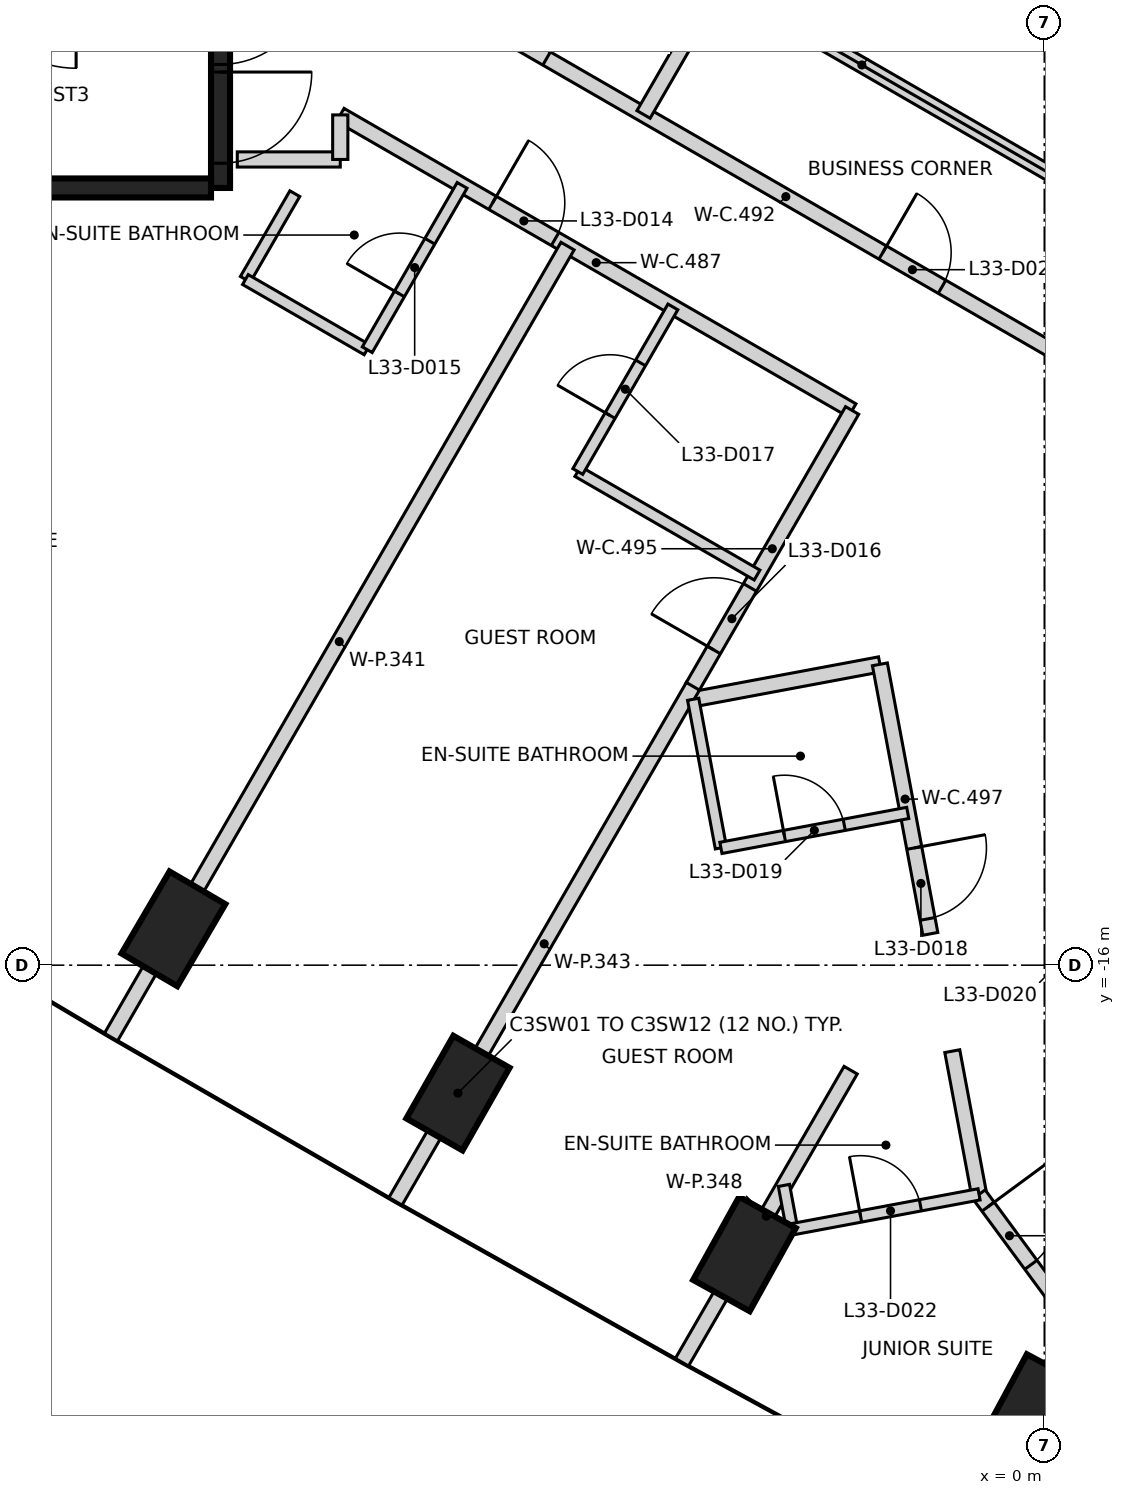
"""IFC4 building model, lengths in metres.
Left out: names, types, materials, properties, quantities, classifications, styles, units other than length and angle.
Written with IfcOpenShell. Run it as: python <this file> out.ifc"""

import sys

from ifc_helpers import new_model, si_unit, direction, frame, frame_2d, origin, origin_2d, place, context, subcontext, project, spatial, rectangle, extrude, element, fill, save


model = new_model("IFC4")
c1 = context("Model", 3, precision=1e-05, world=origin(), true_north=direction((0.0, 1.0)))
c2 = subcontext(c1, "Body", "Model", "MODEL_VIEW")
j1 = project(units=[si_unit("LENGTHUNIT", "METRE"), si_unit("PLANEANGLEUNIT", "RADIAN")], contexts=[c1])
p1 = place(None, origin())
s1 = spatial("IfcSite", under=j1, at=p1, CompositionType="ELEMENT")
p2 = place(p1, origin())
s2 = spatial("IfcBuilding", under=s1, at=p2, CompositionType="ELEMENT")
p3 = place(p2, frame((0.0, 0.0, 136.0)))
s3 = spatial("IfcBuildingStorey", under=s2, at=p3, CompositionType="ELEMENT", Elevation=136.0)
for number, where, z_axis, x_axis in (
    (1, (-11.457, -15.522, -0.4), (0.0, 0.0, 1.0), (0.505, 0.863, 0.0)),
    (2, (-7.714, -17.683, -0.4), (0.0, 0.0, 1.0), (0.495, 0.869, 0.0)),
    (3, (-3.945, -19.8, -0.4), (0.0, 0.0, 1.0), (0.485, 0.875, 0.0)),
    (4, (-0.151, -21.871, -0.4), (0.0, 0.0, 1.0), (0.474, 0.881, 0.0)),
):
    element("IfcColumn", number, at=place(p3, frame(where, z_axis=z_axis, x_axis=x_axis)), inside=s3, PredefinedType="COLUMN", context=c2, shape_type="SweptSolid", body=[
        extrude(rectangle(XDim=1.25, YDim=0.85, at=origin_2d()), origin(), (0.0, 0.0, 1.0), 3.6),
    ])
p4 = place(p3, frame((-10.837, 5.775, 0.0), z_axis=(0.0, 0.0, 1.0), x_axis=(0.0, -1.0, 0.0)))
e5 = element("IfcWall", 5, at=p4, inside=s3, PredefinedType="SHEAR", context=c2, shape_type="SweptSolid", body=[
    extrude(rectangle(XDim=11.55, YDim=0.25, at=frame_2d((5.775, 0.0))), origin(), (0.0, 0.0, 1.0), 3.2),
])
p5 = place(p4, frame((10.025, 0.0, 0.0)))
e6 = element("IfcOpeningElement", 6, at=p5, cuts=e5, PredefinedType="OPENING", context=c2, shape_type="SweptSolid", body=[
    extrude(rectangle(XDim=1.2, YDim=2.1, at=frame_2d((0.6, 1.05))), frame((0.0, 0.135, 0.0), z_axis=(0.0, -1.0, 0.0), x_axis=(1.0, 0.0, 0.0)), (0.0, 0.0, 1.0), 0.27),
])
p6 = place(p4, frame((8.725, 0.0, 0.0)))
e7 = element("IfcOpeningElement", 7, at=p6, cuts=e5, PredefinedType="OPENING", context=c2, shape_type="SweptSolid", body=[
    extrude(rectangle(XDim=1.2, YDim=2.1, at=frame_2d((0.6, 1.05))), frame((0.0, 0.135, 0.0), z_axis=(0.0, -1.0, 0.0), x_axis=(1.0, 0.0, 0.0)), (0.0, 0.0, 1.0), 0.27),
])
p7 = place(p3, frame((-10.963, -5.775, 0.0), z_axis=(0.0, 0.0, 1.0), x_axis=(-1.0, 0.0, 0.0)))
e8 = element("IfcWall", 8, at=p7, inside=s3, PredefinedType="SHEAR", context=c2, shape_type="SweptSolid", body=[
    extrude(rectangle(XDim=5.225, YDim=0.25, at=frame_2d((2.612, 0.0))), origin(), (0.0, 0.0, 1.0), 3.2),
])
p8 = place(p3, frame((-10.617, -5.4, 0.0), z_axis=(0.0, 0.0, 1.0), x_axis=(1.0, 0.0, 0.0)))
e9 = element("IfcWall", 9, at=p8, inside=s3, PredefinedType="PARTITIONING", context=c2, shape_type="SweptSolid", body=[
    extrude(rectangle(XDim=1.355, YDim=0.2, at=frame_2d((0.677, 0.0))), origin(), (0.0, 0.0, 1.0), 3.2),
])
p9 = place(p3, frame((-9.262, -4.814, 0.0), z_axis=(0.0, 0.0, 1.0), x_axis=(0.866109782156, -0.499853823887, 0.0)))
e10 = element("IfcWall", 10, at=p9, inside=s3, PredefinedType="PARTITIONING", context=c2, shape_type="SweptSolid", body=[
    extrude(rectangle(XDim=7.776, YDim=0.2, at=frame_2d((3.888, 0.0))), origin(), (0.0, 0.0, 1.0), 3.2),
])
p10 = place(p9, frame((2.314, 0.0, 0.0)))
e11 = element("IfcOpeningElement", 11, at=p10, cuts=e10, PredefinedType="OPENING", context=c2, shape_type="SweptSolid", body=[
    extrude(rectangle(XDim=0.95, YDim=2.1, at=frame_2d((0.475, 1.05))), frame((0.0, 0.11, 0.0), z_axis=(0.0, -1.0, 0.0), x_axis=(1.0, 0.0, 0.0)), (0.0, 0.0, 1.0), 0.22),
])
p11 = place(p3, frame((-9.262, -5.4, 0.0), z_axis=(0.0, 0.0, 1.0), x_axis=(0.0, 1.0, 0.0)))
e12 = element("IfcWall", 12, at=p11, inside=s3, PredefinedType="PARTITIONING", context=c2, shape_type="SweptSolid", body=[
    extrude(rectangle(XDim=0.586, YDim=0.2, at=frame_2d((0.293, 0.0))), origin(), (0.0, 0.0, 1.0), 3.2),
])
p12 = place(p3, frame((-8.612, -2.88, 0.0), z_axis=(0.0, 0.0, 1.0), x_axis=(0.866035279512, -0.499982894348, 0.0)))
e13 = element("IfcWall", 13, at=p12, inside=s3, PredefinedType="PARTITIONING", context=c2, shape_type="SweptSolid", body=[
    extrude(rectangle(XDim=12.037, YDim=0.2, at=frame_2d((6.018, 0.0))), origin(), (0.0, 0.0, 1.0), 3.2),
])
p13 = place(p12, frame((1.484, 0.0, 0.0)))
e14 = element("IfcOpeningElement", 14, at=p13, cuts=e13, PredefinedType="OPENING", context=c2, shape_type="SweptSolid", body=[
    extrude(rectangle(XDim=0.9, YDim=2.1, at=frame_2d((0.45, 1.05))), frame((0.0, 0.11, 0.0), z_axis=(0.0, -1.0, 0.0), x_axis=(1.0, 0.0, 0.0)), (0.0, 0.0, 1.0), 0.22),
])
p14 = place(p12, frame((7.491, 0.0, 0.0)))
e15 = element("IfcOpeningElement", 15, at=p14, cuts=e13, PredefinedType="OPENING", context=c2, shape_type="SweptSolid", body=[
    extrude(rectangle(XDim=0.9, YDim=2.1, at=frame_2d((0.45, 1.05))), frame((0.0, 0.11, 0.0), z_axis=(0.0, -1.0, 0.0), x_axis=(1.0, 0.0, 0.0)), (0.0, 0.0, 1.0), 0.22),
])
p15 = place(p3, frame((-4.629, -12.341, 0.0), z_axis=(0.0, 0.0, 1.0), x_axis=(0.500069467685, 0.865985292883, 0.0)))
e16 = element("IfcWall", 16, at=p15, inside=s3, PredefinedType="PARTITIONING", context=c2, shape_type="SweptSolid", body=[
    extrude(rectangle(XDim=4.202, YDim=0.2, at=frame_2d((2.101, 0.0))), origin(), (0.0, 0.0, 1.0), 3.2),
])
p16 = place(p15, frame((0.564, 0.0, 0.0)))
e17 = element("IfcOpeningElement", 17, at=p16, cuts=e16, PredefinedType="OPENING", context=c2, shape_type="SweptSolid", body=[
    extrude(rectangle(XDim=0.95, YDim=2.1, at=frame_2d((0.475, 1.05))), frame((0.0, 0.11, 0.0), z_axis=(0.0, -1.0, 0.0), x_axis=(1.0, 0.0, 0.0)), (0.0, 0.0, 1.0), 0.22),
])
p17 = place(p3, frame((-4.6, -12.498, 0.0), z_axis=(0.0, 0.0, 1.0), x_axis=(0.982950102255, 0.183872500602, 0.0)))
e18 = element("IfcWall", 18, at=p17, inside=s3, PredefinedType="PARTITIONING", context=c2, shape_type="SweptSolid", body=[
    extrude(rectangle(XDim=2.48, YDim=0.2, at=frame_2d((1.24, 0.0))), origin(), (0.0, 0.0, 1.0), 3.2),
])
p18 = place(p3, frame((-2.163, -12.042, 0.0), z_axis=(0.0, 0.0, 1.0), x_axis=(0.183945287989, -0.982936483719, 0.0)))
e19 = element("IfcWall", 19, at=p18, inside=s3, PredefinedType="PARTITIONING", context=c2, shape_type="SweptSolid", body=[
    extrude(rectangle(XDim=3.607, YDim=0.2, at=frame_2d((1.804, 0.0))), origin(), (0.0, 0.0, 1.0), 3.2),
])
p19 = place(p18, frame((2.458, 0.0, 0.0)))
e20 = element("IfcOpeningElement", 20, at=p19, cuts=e19, PredefinedType="OPENING", context=c2, shape_type="SweptSolid", body=[
    extrude(rectangle(XDim=0.95, YDim=2.1, at=frame_2d((0.475, 1.05))), frame((0.0, 0.11, 0.0), z_axis=(0.0, -1.0, 0.0), x_axis=(1.0, 0.0, 0.0)), (0.0, 0.0, 1.0), 0.22),
])
p20 = place(p3, frame((-1.21, -17.131, 0.0), z_axis=(0.0, 0.0, 1.0), x_axis=(0.183950101319, -0.982935582948, 0.0)))
e21 = element("IfcWall", 21, at=p20, inside=s3, PredefinedType="PARTITIONING", context=c2, shape_type="SweptSolid", body=[
    extrude(rectangle(XDim=1.917, YDim=0.2, at=frame_2d((0.958, 0.0))), origin(), (0.0, 0.0, 1.0), 3.2),
])
p21 = place(p3, frame((-0.858, -19.016, 0.0), z_axis=(0.0, 0.0, 1.0), x_axis=(0.593123867414, -0.805111220829, 0.0)))
e22 = element("IfcWall", 22, at=p21, inside=s3, PredefinedType="PARTITIONING", context=c2, shape_type="SweptSolid", body=[
    extrude(rectangle(XDim=2.77, YDim=0.2, at=frame_2d((1.385, 0.0))), origin(), (0.0, 0.0, 1.0), 3.2),
])
p22 = place(p21, frame((0.2, 0.0, 0.0)))
e23 = element("IfcOpeningElement", 23, at=p22, cuts=e22, PredefinedType="OPENING", context=c2, shape_type="SweptSolid", body=[
    extrude(rectangle(XDim=0.95, YDim=2.1, at=frame_2d((0.475, 1.05))), frame((0.0, 0.11, 0.0), z_axis=(0.0, -1.0, 0.0), x_axis=(1.0, 0.0, 0.0)), (0.0, 0.0, 1.0), 0.22),
])
p23 = place(p3, frame((-12.278, -16.946, 0.0), z_axis=(0.0, 0.0, 1.0), x_axis=(0.499887212932, 0.866090511637, 0.0)))
e24 = element("IfcWall", 24, at=p23, inside=s3, PredefinedType="PARTITIONING", context=c2, shape_type="SweptSolid", body=[
    extrude(rectangle(XDim=12.015, YDim=0.2, at=frame_2d((6.007, 0.0))), origin(), (0.0, 0.0, 1.0), 3.2),
])
p24 = place(p3, frame((-8.535, -19.107, 0.0), z_axis=(0.0, 0.0, 1.0), x_axis=(0.500028565219, 0.866008911019, 0.0)))
e25 = element("IfcWall", 25, at=p24, inside=s3, PredefinedType="PARTITIONING", context=c2, shape_type="SweptSolid", body=[
    extrude(rectangle(XDim=7.824, YDim=0.2, at=frame_2d((3.912, 0.0))), origin(), (0.0, 0.0, 1.0), 3.2),
])
p25 = place(p3, frame((-8.0, -0.924, 0.0), z_axis=(0.0, 0.0, 1.0), x_axis=(0.86604129137, -0.499972480886, 0.0)))
e26 = element("IfcWall", 26, at=p25, inside=s3, PredefinedType="PARTITIONING", context=c2, shape_type="SweptSolid", body=[
    extrude(rectangle(XDim=12.932, YDim=0.2, at=frame_2d((6.466, 0.0))), origin(), (0.0, 0.0, 1.0), 2.3),
])
p26 = place(p3, frame((-5.272, -4.808, 0.0), z_axis=(0.0, 0.0, 1.0), x_axis=(0.499880961361, 0.866094119867, 0.0)))
e27 = element("IfcWall", 27, at=p26, inside=s3, PredefinedType="PARTITIONING", context=c2, shape_type="SweptSolid", body=[
    extrude(rectangle(XDim=2.0, YDim=0.2, at=frame_2d((1.0, 0.0))), origin(), (0.0, 0.0, 1.0), 2.3),
])
p27 = place(p3, frame((-4.767, -21.223, 0.0), z_axis=(0.0, 0.0, 1.0), x_axis=(0.500305100915, 0.865849182017, 0.0)))
e28 = element("IfcWall", 28, at=p27, inside=s3, PredefinedType="PARTITIONING", context=c2, shape_type="SweptSolid", body=[
    extrude(rectangle(XDim=4.437, YDim=0.2, at=frame_2d((2.218, 0.0))), origin(), (0.0, 0.0, 1.0), 3.2),
])
p28 = place(p3, frame((-10.511, -6.977, 0.0), z_axis=(0.0, 0.0, 1.0), x_axis=(0.500274472704, 0.865866878891, 0.0)))
e29 = element("IfcWall", 29, at=p28, inside=s3, PredefinedType="PARTITIONING", context=c2, shape_type="SweptSolid", body=[
    extrude(rectangle(XDim=1.302, YDim=0.15, at=frame_2d((0.651, 0.0))), origin(), (0.0, 0.0, 1.0), 3.2),
])
p29 = place(p3, frame((-10.51, -6.98, 0.0), z_axis=(0.0, 0.0, 1.0), x_axis=(0.865965533559, -0.500103683937, 0.0)))
e30 = element("IfcWall", 30, at=p29, inside=s3, PredefinedType="PARTITIONING", context=c2, shape_type="SweptSolid", body=[
    extrude(rectangle(XDim=1.848, YDim=0.15, at=frame_2d((0.924, 0.0))), origin(), (0.0, 0.0, 1.0), 3.2),
])
p30 = place(p3, frame((-8.907, -7.903, 0.0), z_axis=(0.0, 0.0, 1.0), x_axis=(0.499925626596, 0.866068339032, 0.0)))
e31 = element("IfcWall", 31, at=p30, inside=s3, PredefinedType="PARTITIONING", context=c2, shape_type="SweptSolid", body=[
    extrude(rectangle(XDim=2.497, YDim=0.15, at=frame_2d((1.248, 0.0))), origin(), (0.0, 0.0, 1.0), 3.2),
])
p31 = place(p30, frame((0.848, 0.0, 0.0)))
e32 = element("IfcOpeningElement", 32, at=p31, cuts=e31, PredefinedType="OPENING", context=c2, shape_type="SweptSolid", body=[
    extrude(rectangle(XDim=0.8, YDim=2.1, at=frame_2d((0.4, 1.05))), frame((0.0, 0.085, 0.0), z_axis=(0.0, -1.0, 0.0), x_axis=(1.0, 0.0, 0.0)), (0.0, 0.0, 1.0), 0.17),
])
p32 = place(p3, frame((-6.137, -9.505, 0.0), z_axis=(0.0, 0.0, 1.0), x_axis=(0.866000497904, -0.50004313577, 0.0)))
e33 = element("IfcWall", 33, at=p32, inside=s3, PredefinedType="PARTITIONING", context=c2, shape_type="SweptSolid", body=[
    extrude(rectangle(XDim=2.724, YDim=0.15, at=frame_2d((1.362, 0.0))), origin(), (0.0, 0.0, 1.0), 3.2),
])
p33 = place(p3, frame((-6.137, -9.505, 0.0), z_axis=(0.0, 0.0, 1.0), x_axis=(0.500339416332, 0.86582935297, 0.0)))
e34 = element("IfcWall", 34, at=p33, inside=s3, PredefinedType="PARTITIONING", context=c2, shape_type="SweptSolid", body=[
    extrude(rectangle(XDim=2.5, YDim=0.15, at=frame_2d((1.25, 0.0))), origin(), (0.0, 0.0, 1.0), 3.2),
])
p34 = place(p33, frame((0.85, 0.0, 0.0)))
e35 = element("IfcOpeningElement", 35, at=p34, cuts=e34, PredefinedType="OPENING", context=c2, shape_type="SweptSolid", body=[
    extrude(rectangle(XDim=0.8, YDim=2.1, at=frame_2d((0.4, 1.05))), frame((0.0, 0.085, 0.0), z_axis=(0.0, -1.0, 0.0), x_axis=(1.0, 0.0, 0.0)), (0.0, 0.0, 1.0), 0.17),
])
p35 = place(p3, frame((-4.619, -12.502, 0.0), z_axis=(0.0, 0.0, 1.0), x_axis=(0.183517674038, -0.983016410502, 0.0)))
e36 = element("IfcWall", 36, at=p35, inside=s3, PredefinedType="PARTITIONING", context=c2, shape_type="SweptSolid", body=[
    extrude(rectangle(XDim=1.989, YDim=0.15, at=frame_2d((0.994, 0.0))), origin(), (0.0, 0.0, 1.0), 3.2),
])
p36 = place(p3, frame((-4.254, -14.457, 0.0), z_axis=(0.0, 0.0, 1.0), x_axis=(0.98293843799, 0.183934844773, 0.0)))
e37 = element("IfcWall", 37, at=p36, inside=s3, PredefinedType="PARTITIONING", context=c2, shape_type="SweptSolid", body=[
    extrude(rectangle(XDim=2.501, YDim=0.15, at=frame_2d((1.25, 0.0))), origin(), (0.0, 0.0, 1.0), 3.2),
])
p37 = place(p36, frame((0.85, 0.0, 0.0)))
e38 = element("IfcOpeningElement", 38, at=p37, cuts=e37, PredefinedType="OPENING", context=c2, shape_type="SweptSolid", body=[
    extrude(rectangle(XDim=0.8, YDim=2.1, at=frame_2d((0.4, 1.05))), frame((0.0, 0.085, 0.0), z_axis=(0.0, -1.0, 0.0), x_axis=(1.0, 0.0, 0.0)), (0.0, 0.0, 1.0), 0.17),
])
p38 = place(p3, frame((-3.425, -18.897, 0.0), z_axis=(0.0, 0.0, 1.0), x_axis=(0.183861553242, -0.982952150025, 0.0)))
e39 = element("IfcWall", 39, at=p38, inside=s3, PredefinedType="PARTITIONING", context=c2, shape_type="SweptSolid", body=[
    extrude(rectangle(XDim=0.587, YDim=0.15, at=frame_2d((0.293, 0.0))), origin(), (0.0, 0.0, 1.0), 3.2),
])
p39 = place(p3, frame((-3.315, -19.474, 0.0), z_axis=(0.0, 0.0, 1.0), x_axis=(0.982978173855, 0.183722371326, 0.0)))
e40 = element("IfcWall", 40, at=p39, inside=s3, PredefinedType="PARTITIONING", context=c2, shape_type="SweptSolid", body=[
    extrude(rectangle(XDim=2.5, YDim=0.15, at=frame_2d((1.25, 0.0))), origin(), (0.0, 0.0, 1.0), 3.2),
])
p40 = place(p39, frame((0.915, 0.0, 0.0)))
e41 = element("IfcOpeningElement", 41, at=p40, cuts=e40, PredefinedType="OPENING", context=c2, shape_type="SweptSolid", body=[
    extrude(rectangle(XDim=0.8, YDim=2.1, at=frame_2d((0.4, 1.05))), frame((0.0, 0.085, 0.0), z_axis=(0.0, -1.0, 0.0), x_axis=(1.0, 0.0, 0.0)), (0.0, 0.0, 1.0), 0.17),
])
p41 = place(p5, origin())
e42 = element("IfcDoor", 42, at=p41, inside=s3, OperationType="SINGLE_SWING_LEFT", PredefinedType="DOOR", context=c2, shape_type="SweptSolid", body=[
    extrude(rectangle(XDim=1.2, YDim=2.1, at=frame_2d((0.6, 1.05))), frame((0.0, 0.025, 0.0), z_axis=(0.0, -1.0, 0.0), x_axis=(1.0, 0.0, 0.0)), (0.0, 0.0, 1.0), 0.05),
])
fill(e6, e42)
p42 = place(p6, origin())
e43 = element("IfcDoor", 43, at=p42, inside=s3, OperationType="SINGLE_SWING_RIGHT", PredefinedType="DOOR", context=c2, shape_type="SweptSolid", body=[
    extrude(rectangle(XDim=1.2, YDim=2.1, at=frame_2d((0.6, 1.05))), frame((0.0, 0.025, 0.0), z_axis=(0.0, -1.0, 0.0), x_axis=(1.0, 0.0, 0.0)), (0.0, 0.0, 1.0), 0.05),
])
fill(e7, e43)
p43 = place(p10, frame((0.95, 0.0, 0.0), z_axis=(0.0, 0.0, 1.0), x_axis=(-1.0, 0.0, 0.0)))
e44 = element("IfcDoor", 44, at=p43, inside=s3, OperationType="SINGLE_SWING_LEFT", PredefinedType="DOOR", context=c2, shape_type="SweptSolid", body=[
    extrude(rectangle(XDim=0.95, YDim=2.1, at=frame_2d((0.475, 1.05))), frame((0.0, 0.025, 0.0), z_axis=(0.0, -1.0, 0.0), x_axis=(1.0, 0.0, 0.0)), (0.0, 0.0, 1.0), 0.05),
])
fill(e11, e44)
p44 = place(p31, origin())
e45 = element("IfcDoor", 45, at=p44, inside=s3, OperationType="SINGLE_SWING_LEFT", PredefinedType="DOOR", context=c2, shape_type="SweptSolid", body=[
    extrude(rectangle(XDim=0.8, YDim=2.1, at=frame_2d((0.4, 1.05))), frame((0.0, 0.025, 0.0), z_axis=(0.0, -1.0, 0.0), x_axis=(1.0, 0.0, 0.0)), (0.0, 0.0, 1.0), 0.05),
])
fill(e32, e45)
p45 = place(p16, origin())
e46 = element("IfcDoor", 46, at=p45, inside=s3, OperationType="SINGLE_SWING_LEFT", PredefinedType="DOOR", context=c2, shape_type="SweptSolid", body=[
    extrude(rectangle(XDim=0.95, YDim=2.1, at=frame_2d((0.475, 1.05))), frame((0.0, 0.025, 0.0), z_axis=(0.0, -1.0, 0.0), x_axis=(1.0, 0.0, 0.0)), (0.0, 0.0, 1.0), 0.05),
])
fill(e17, e46)
p46 = place(p34, frame((0.8, 0.0, 0.0), z_axis=(0.0, 0.0, 1.0), x_axis=(-1.0, 0.0, 0.0)))
e47 = element("IfcDoor", 47, at=p46, inside=s3, OperationType="SINGLE_SWING_LEFT", PredefinedType="DOOR", context=c2, shape_type="SweptSolid", body=[
    extrude(rectangle(XDim=0.8, YDim=2.1, at=frame_2d((0.4, 1.05))), frame((0.0, 0.025, 0.0), z_axis=(0.0, -1.0, 0.0), x_axis=(1.0, 0.0, 0.0)), (0.0, 0.0, 1.0), 0.05),
])
fill(e35, e47)
p47 = place(p19, frame((0.95, 0.0, 0.0), z_axis=(0.0, 0.0, 1.0), x_axis=(-1.0, 0.0, 0.0)))
e48 = element("IfcDoor", 48, at=p47, inside=s3, OperationType="SINGLE_SWING_LEFT", PredefinedType="DOOR", context=c2, shape_type="SweptSolid", body=[
    extrude(rectangle(XDim=0.95, YDim=2.1, at=frame_2d((0.475, 1.05))), frame((0.0, 0.025, 0.0), z_axis=(0.0, -1.0, 0.0), x_axis=(1.0, 0.0, 0.0)), (0.0, 0.0, 1.0), 0.05),
])
fill(e20, e48)
p48 = place(p37, frame((0.8, 0.0, 0.0), z_axis=(0.0, 0.0, 1.0), x_axis=(-1.0, 0.0, 0.0)))
e49 = element("IfcDoor", 49, at=p48, inside=s3, OperationType="SINGLE_SWING_LEFT", PredefinedType="DOOR", context=c2, shape_type="SweptSolid", body=[
    extrude(rectangle(XDim=0.8, YDim=2.1, at=frame_2d((0.4, 1.05))), frame((0.0, 0.025, 0.0), z_axis=(0.0, -1.0, 0.0), x_axis=(1.0, 0.0, 0.0)), (0.0, 0.0, 1.0), 0.05),
])
fill(e38, e49)
p49 = place(p22, frame((0.95, 0.0, 0.0), z_axis=(0.0, 0.0, 1.0), x_axis=(-1.0, 0.0, 0.0)))
e50 = element("IfcDoor", 50, at=p49, inside=s3, OperationType="SINGLE_SWING_LEFT", PredefinedType="DOOR", context=c2, shape_type="SweptSolid", body=[
    extrude(rectangle(XDim=0.95, YDim=2.1, at=frame_2d((0.475, 1.05))), frame((0.0, 0.025, 0.0), z_axis=(0.0, -1.0, 0.0), x_axis=(1.0, 0.0, 0.0)), (0.0, 0.0, 1.0), 0.05),
])
fill(e23, e50)
p50 = place(p40, frame((0.8, 0.0, 0.0), z_axis=(0.0, 0.0, 1.0), x_axis=(-1.0, 0.0, 0.0)))
e51 = element("IfcDoor", 51, at=p50, inside=s3, OperationType="SINGLE_SWING_LEFT", PredefinedType="DOOR", context=c2, shape_type="SweptSolid", body=[
    extrude(rectangle(XDim=0.8, YDim=2.1, at=frame_2d((0.4, 1.05))), frame((0.0, 0.025, 0.0), z_axis=(0.0, -1.0, 0.0), x_axis=(1.0, 0.0, 0.0)), (0.0, 0.0, 1.0), 0.05),
])
fill(e41, e51)
p51 = place(p13, origin())
e52 = element("IfcDoor", 52, at=p51, inside=s3, OperationType="SINGLE_SWING_LEFT", PredefinedType="DOOR", context=c2, shape_type="SweptSolid", body=[
    extrude(rectangle(XDim=0.9, YDim=2.1, at=frame_2d((0.45, 1.05))), frame((0.0, 0.025, 0.0), z_axis=(0.0, -1.0, 0.0), x_axis=(1.0, 0.0, 0.0)), (0.0, 0.0, 1.0), 0.05),
])
fill(e14, e52)
p52 = place(p14, origin())
e53 = element("IfcDoor", 53, at=p52, inside=s3, OperationType="SINGLE_SWING_LEFT", PredefinedType="DOOR", context=c2, shape_type="SweptSolid", body=[
    extrude(rectangle(XDim=0.9, YDim=2.1, at=frame_2d((0.45, 1.05))), frame((0.0, 0.025, 0.0), z_axis=(0.0, -1.0, 0.0), x_axis=(1.0, 0.0, 0.0)), (0.0, 0.0, 1.0), 0.05),
])
fill(e15, e53)
save(model, sys.argv[1])
